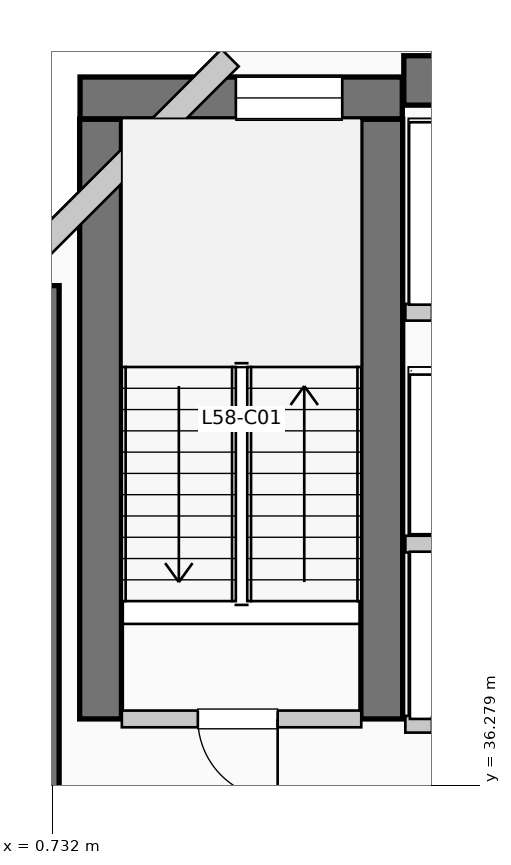
"""IFC4 building model, lengths in metres.
Left out: names, types, materials, properties, quantities, classifications, styles, units other than length and angle.
Written with IfcOpenShell. Run it as: python <this file> out.ifc"""

import sys

from ifc_helpers import new_model, si_unit, direction, frame, frame_2d, origin, place, context, subcontext, project, spatial, rectangle, extrude, element, fill, save


model = new_model("IFC4")
c1 = context("Model", 3, precision=1e-05, world=origin(), true_north=direction((0.0, 1.0)))
c2 = subcontext(c1, "Body", "Model", "MODEL_VIEW")
j1 = project(units=[si_unit("LENGTHUNIT", "METRE"), si_unit("PLANEANGLEUNIT", "RADIAN")], contexts=[c1])
p1 = place(None, origin())
s1 = spatial("IfcSite", under=j1, at=p1, CompositionType="ELEMENT")
p2 = place(p1, origin())
s2 = spatial("IfcBuilding", under=s1, at=p2, CompositionType="ELEMENT")
p3 = place(p2, frame((0.0, 0.0, 239.58)))
s3 = spatial("IfcBuildingStorey", under=s2, at=p3, CompositionType="ELEMENT", Elevation=239.58)
p4 = place(p3, frame((5.36, 45.55, 0.0), z_axis=(0.0, 0.0, 1.0), x_axis=(1.0, 0.0, 0.0)))
e1 = element("IfcWall", 1, at=p4, inside=s3, PredefinedType="SHEAR", context=c2, shape_type="SweptSolid", body=[
    extrude(rectangle(XDim=13.98, YDim=0.65, at=frame_2d((6.99, 0.0))), origin(), (0.0, 0.0, 1.0), 3.96),
])
p5 = place(p3, frame((0.5, 34.95, 0.0), z_axis=(0.0, 0.0, 1.0), x_axis=(0.0, 1.0, 0.0)))
e2 = element("IfcWall", 2, at=p5, inside=s3, PredefinedType="SHEAR", context=c2, shape_type="SweptSolid", body=[
    extrude(rectangle(XDim=7.9, YDim=0.65, at=frame_2d((3.95, 0.0))), origin(), (0.0, 0.0, 1.0), 3.96),
])
for number, where, z_axis, x_axis in (
    (3, (1.37, 37.15, 0.0), (0.0, 0.0, 1.0), (0.0, 1.0, 0.0)),
    (4, (5.07, 37.15, 0.0), (0.0, 0.0, 1.0), (0.0, 1.0, 0.0)),
):
    element("IfcWall", number, at=place(p3, frame(where, z_axis=z_axis, x_axis=x_axis)), inside=s3, PredefinedType="SHEAR", context=c2, shape_type="SweptSolid", body=[
        extrude(rectangle(XDim=7.89, YDim=0.55, at=frame_2d((3.945, 0.0))), origin(), (0.0, 0.0, 1.0), 3.96),
    ])
p6 = place(p3, frame((1.1, 45.32, 0.0), z_axis=(0.0, 0.0, 1.0), x_axis=(1.0, 0.0, 0.0)))
e5 = element("IfcWall", 5, at=p6, inside=s3, PredefinedType="SHEAR", context=c2, shape_type="SweptSolid", body=[
    extrude(rectangle(XDim=4.24, YDim=0.55, at=frame_2d((2.12, 0.0))), origin(), (0.0, 0.0, 1.0), 3.96),
])
p7 = place(p6, frame((2.05, 0.0, 1.05)))
e6 = element("IfcOpeningElement", 6, at=p7, cuts=e5, PredefinedType="OPENING", context=c2, shape_type="SweptSolid", body=[
    extrude(rectangle(XDim=1.4, YDim=1.8, at=frame_2d((0.7, 0.9))), frame((0.0, 0.285, 0.0), z_axis=(0.0, -1.0, 0.0), x_axis=(1.0, 0.0, 0.0)), (0.0, 0.0, 1.0), 0.57),
])
p8 = place(p3, frame((3.074, 45.848, 0.0), z_axis=(0.0, 0.0, 1.0), x_axis=(-0.707106781187, -0.707106781187, 0.0)))
e7 = element("IfcWall", 7, at=p8, inside=s3, PredefinedType="SOLIDWALL", context=c2, shape_type="SweptSolid", body=[
    extrude(rectangle(XDim=4.133, YDim=0.32, at=frame_2d((2.066, 0.0))), origin(), (0.0, 0.0, 1.0), 3.71),
])
p9 = place(p3, frame((1.65, 37.15, 0.0), z_axis=(0.0, 0.0, 1.0), x_axis=(1.0, 0.0, 0.0)))
e8 = element("IfcWall", 8, at=p9, inside=s3, PredefinedType="PARTITIONING", context=c2, shape_type="SweptSolid", body=[
    extrude(rectangle(XDim=3.15, YDim=0.22, at=frame_2d((1.575, 0.0))), origin(), (0.0, 0.0, 1.0), 3.71),
])
p10 = place(p9, frame((2.05, 0.0, 0.0), z_axis=(0.0, 0.0, 1.0), x_axis=(-1.0, 0.0, 0.0)))
e9 = element("IfcOpeningElement", 9, at=p10, cuts=e8, PredefinedType="OPENING", context=c2, shape_type="SweptSolid", body=[
    extrude(rectangle(XDim=1.05, YDim=2.15, at=frame_2d((0.525, 1.075))), frame((0.0, 0.12, 0.0), z_axis=(0.0, -1.0, 0.0), x_axis=(1.0, 0.0, 0.0)), (0.0, 0.0, 1.0), 0.24),
])
p11 = place(p3, frame((5.38, 37.08, 0.0), z_axis=(0.0, 0.0, 1.0), x_axis=(1.0, 0.0, 0.0)))
e10 = element("IfcWall", 10, at=p11, inside=s3, PredefinedType="PARTITIONING", context=c2, shape_type="SweptSolid", body=[
    extrude(rectangle(XDim=3.46, YDim=0.22, at=frame_2d((1.73, 0.0))), origin(), (0.0, 0.0, 1.0), 3.71),
])
p12 = place(p11, frame((1.55, 0.0, 0.0), z_axis=(0.0, 0.0, 1.0), x_axis=(-1.0, 0.0, 0.0)))
e11 = element("IfcOpeningElement", 11, at=p12, cuts=e10, PredefinedType="OPENING", context=c2, shape_type="SweptSolid", body=[
    extrude(rectangle(XDim=1.2, YDim=2.2, at=frame_2d((0.6, 1.1))), frame((0.0, 0.12, 0.0), z_axis=(0.0, -1.0, 0.0), x_axis=(1.0, 0.0, 0.0)), (0.0, 0.0, 1.0), 0.24),
])
p13 = place(p11, frame((3.22, 0.0, 0.0), z_axis=(0.0, 0.0, 1.0), x_axis=(-1.0, 0.0, 0.0)))
e12 = element("IfcOpeningElement", 12, at=p13, cuts=e10, PredefinedType="OPENING", context=c2, shape_type="SweptSolid", body=[
    extrude(rectangle(XDim=1.2, YDim=2.2, at=frame_2d((0.6, 1.1))), frame((0.0, 0.12, 0.0), z_axis=(0.0, -1.0, 0.0), x_axis=(1.0, 0.0, 0.0)), (0.0, 0.0, 1.0), 0.24),
])
p14 = place(p3, frame((5.38, 39.45, 0.0), z_axis=(0.0, 0.0, 1.0), x_axis=(1.0, 0.0, 0.0)))
e13 = element("IfcWall", 13, at=p14, inside=s3, PredefinedType="PARTITIONING", context=c2, shape_type="SweptSolid", body=[
    extrude(rectangle(XDim=3.46, YDim=0.22, at=frame_2d((1.73, 0.0))), origin(), (0.0, 0.0, 1.0), 3.71),
])
p15 = place(p3, frame((5.38, 42.5, 0.0), z_axis=(0.0, 0.0, 1.0), x_axis=(1.0, 0.0, 0.0)))
e14 = element("IfcWall", 14, at=p15, inside=s3, PredefinedType="PARTITIONING", context=c2, shape_type="SweptSolid", body=[
    extrude(rectangle(XDim=3.77, YDim=0.22, at=frame_2d((1.885, 0.0))), origin(), (0.0, 0.0, 1.0), 3.71),
])
p16 = place(p15, frame((1.75, 0.0, 0.0), z_axis=(0.0, 0.0, 1.0), x_axis=(-1.0, 0.0, 0.0)))
e15 = element("IfcOpeningElement", 15, at=p16, cuts=e14, PredefinedType="OPENING", context=c2, shape_type="SweptSolid", body=[
    extrude(rectangle(XDim=1.4, YDim=2.2, at=frame_2d((0.7, 1.1))), frame((0.0, 0.12, 0.0), z_axis=(0.0, -1.0, 0.0), x_axis=(1.0, 0.0, 0.0)), (0.0, 0.0, 1.0), 0.24),
])
p17 = place(p15, frame((3.53, 0.0, 0.0), z_axis=(0.0, 0.0, 1.0), x_axis=(-1.0, 0.0, 0.0)))
e16 = element("IfcOpeningElement", 16, at=p17, cuts=e14, PredefinedType="OPENING", context=c2, shape_type="SweptSolid", body=[
    extrude(rectangle(XDim=1.4, YDim=2.2, at=frame_2d((0.7, 1.1))), frame((0.0, 0.12, 0.0), z_axis=(0.0, -1.0, 0.0), x_axis=(1.0, 0.0, 0.0)), (0.0, 0.0, 1.0), 0.24),
])
p18 = place(p7, origin())
e17 = element("IfcWindow", 17, at=p18, inside=s3, PartitioningType="SINGLE_PANEL", PredefinedType="WINDOW", context=c2, shape_type="SweptSolid", body=[
    extrude(rectangle(XDim=1.4, YDim=1.8, at=frame_2d((0.7, 0.9))), frame((0.0, 0.03, 0.0), z_axis=(0.0, -1.0, 0.0), x_axis=(1.0, 0.0, 0.0)), (0.0, 0.0, 1.0), 0.06),
])
fill(e6, e17)
p19 = place(p10, origin())
e18 = element("IfcDoor", 18, at=p19, inside=s3, OperationType="SINGLE_SWING_RIGHT", PredefinedType="DOOR", context=c2, shape_type="SweptSolid", body=[
    extrude(rectangle(XDim=1.05, YDim=2.15, at=frame_2d((0.525, 1.075))), frame((0.0, 0.025, 0.0), z_axis=(0.0, -1.0, 0.0), x_axis=(1.0, 0.0, 0.0)), (0.0, 0.0, 1.0), 0.05),
])
fill(e9, e18)
save(model, sys.argv[1])
